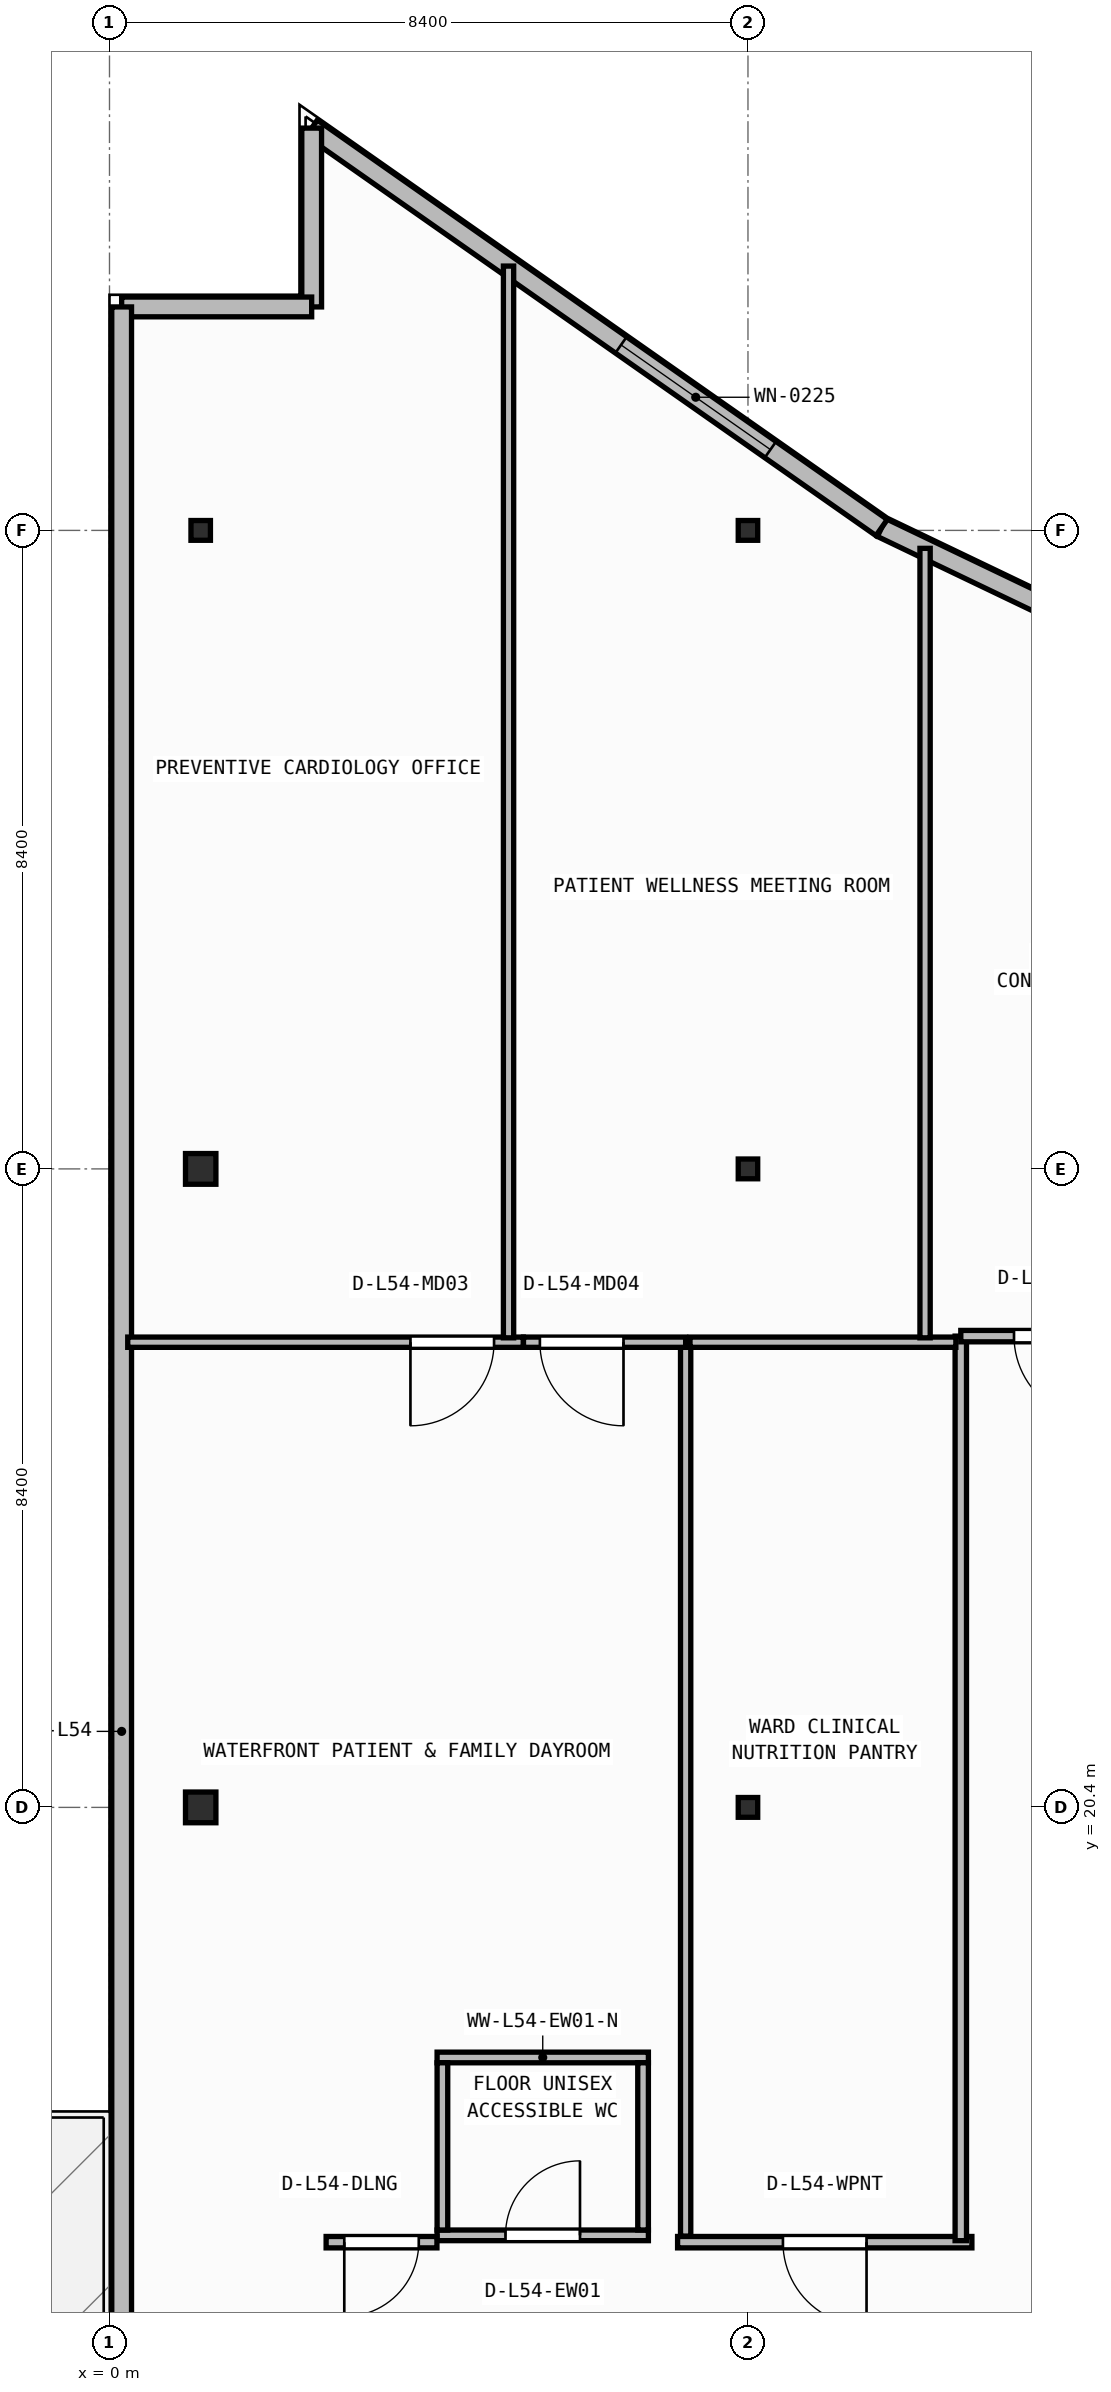
"""IFC4 building model, lengths in metres.
Left out: names, types, materials, properties, quantities, classifications, styles, units other than length and angle.
Written with IfcOpenShell. Run it as: python <this file> out.ifc"""

import sys

from ifc_helpers import new_model, si_unit, direction, frame, frame_2d, origin, origin_2d, place, context, subcontext, project, spatial, rectangle, i_section, extrude, element, fill, save


model = new_model("IFC4")
c1 = context("Model", 3, precision=1e-05, world=origin(), true_north=direction((0.0, 1.0)))
c2 = subcontext(c1, "Body", "Model", "MODEL_VIEW")
j1 = project(units=[si_unit("LENGTHUNIT", "METRE"), si_unit("PLANEANGLEUNIT", "RADIAN")], contexts=[c1])
p1 = place(None, origin())
s1 = spatial("IfcSite", under=j1, at=p1, CompositionType="ELEMENT")
p2 = place(p1, origin())
s2 = spatial("IfcBuilding", under=s1, at=p2, CompositionType="ELEMENT")
p3 = place(p2, frame((0.0, 0.0, 219.75)))
s3 = spatial("IfcBuildingStorey", under=s2, at=p3, CompositionType="ELEMENT", Elevation=219.75)
p4 = place(p3, frame((1.2, 20.4, 0.0), z_axis=(0.0, 0.0, 1.0), x_axis=(1.0, 0.0, 0.0)))
e1 = element("IfcColumn", 1, at=p4, inside=s3, PredefinedType="COLUMN", context=c2, shape_type="SweptSolid", body=[
    extrude(i_section(OverallWidth=0.4, OverallDepth=0.404, WebThickness=0.02, FlangeThickness=0.032, at=origin_2d()), origin(), (0.0, 0.0, 1.0), 3.95),
])
p5 = place(p3, frame((8.4, 20.4, 0.0), z_axis=(0.0, 0.0, 1.0), x_axis=(1.0, 0.0, 0.0)))
e2 = element("IfcColumn", 2, at=p5, inside=s3, PredefinedType="COLUMN", context=c2, shape_type="SweptSolid", body=[
    extrude(i_section(OverallWidth=0.256, OverallDepth=0.26, WebThickness=0.01, FlangeThickness=0.017, FilletRadius=0.013, at=origin_2d()), origin(), (0.0, 0.0, 1.0), 3.95),
])
p6 = place(p3, frame((1.2, 28.8, 0.0), z_axis=(0.0, 0.0, 1.0), x_axis=(1.0, 0.0, 0.0)))
e3 = element("IfcColumn", 3, at=p6, inside=s3, PredefinedType="COLUMN", context=c2, shape_type="SweptSolid", body=[
    extrude(i_section(OverallWidth=0.4, OverallDepth=0.404, WebThickness=0.02, FlangeThickness=0.032, at=origin_2d()), origin(), (0.0, 0.0, 1.0), 3.95),
])
for number, where, z_axis, x_axis in (
    (4, (8.4, 28.8, 0.0), (0.0, 0.0, 1.0), (1.0, 0.0, 0.0)),
    (5, (1.2, 37.2, 0.0), (0.0, 0.0, 1.0), (1.0, 0.0, 0.0)),
    (6, (8.4, 37.2, 0.0), (0.0, 0.0, 1.0), (1.0, 0.0, 0.0)),
):
    element("IfcColumn", number, at=place(p3, frame(where, z_axis=z_axis, x_axis=x_axis)), inside=s3, PredefinedType="COLUMN", context=c2, shape_type="SweptSolid", body=[
        extrude(i_section(OverallWidth=0.256, OverallDepth=0.26, WebThickness=0.01, FlangeThickness=0.017, FilletRadius=0.013, at=origin_2d()), origin(), (0.0, 0.0, 1.0), 3.95),
    ])
p7 = place(p3, frame((21.461, 31.823, 0.0), z_axis=(0.0, 0.0, 1.0), x_axis=(-0.901858094827, 0.432032379336, 0.0)))
e7 = element("IfcWall", 7, at=p7, inside=s3, PredefinedType="STANDARD", context=c2, shape_type="SweptSolid", body=[
    extrude(rectangle(XDim=12.532, YDim=0.26, at=frame_2d((6.266, 0.0))), origin(), (0.0, 0.0, 1.0), 3.71),
])
p8 = place(p7, frame((2.71, 0.0, 0.9)))
e8 = element("IfcOpeningElement", 8, at=p8, cuts=e7, PredefinedType="OPENING", context=c2, shape_type="SweptSolid", body=[
    extrude(rectangle(XDim=2.4, YDim=1.65, at=frame_2d((1.2, 0.825))), frame((0.0, 0.14, 0.0), z_axis=(0.0, -1.0, 0.0), x_axis=(1.0, 0.0, 0.0)), (0.0, 0.0, 1.0), 0.28),
])
p9 = place(p3, frame((10.159, 37.237, 0.0), z_axis=(0.0, 0.0, 1.0), x_axis=(-0.818933702389, 0.57388813465, 0.0)))
e9 = element("IfcWall", 9, at=p9, inside=s3, PredefinedType="STANDARD", context=c2, shape_type="SweptSolid", body=[
    extrude(rectangle(XDim=9.157, YDim=0.26, at=frame_2d((4.579, 0.0))), origin(), (0.0, 0.0, 1.0), 3.71),
])
p10 = place(p9, frame((1.787, 0.0, 0.9)))
e10 = element("IfcOpeningElement", 10, at=p10, cuts=e9, PredefinedType="OPENING", context=c2, shape_type="SweptSolid", body=[
    extrude(rectangle(XDim=2.4, YDim=1.65, at=frame_2d((1.2, 0.825))), frame((0.0, 0.14, 0.0), z_axis=(0.0, -1.0, 0.0), x_axis=(1.0, 0.0, 0.0)), (0.0, 0.0, 1.0), 0.28),
])
p11 = place(p3, frame((2.66, 42.492, 0.0), z_axis=(0.0, 0.0, 1.0), x_axis=(0.0, -1.0, 0.0)))
e11 = element("IfcWall", 11, at=p11, inside=s3, PredefinedType="STANDARD", context=c2, shape_type="SweptSolid", body=[
    extrude(rectangle(XDim=2.353, YDim=0.26, at=frame_2d((1.176, 0.0))), origin(), (0.0, 0.0, 1.0), 3.71),
])
p12 = place(p3, frame((2.66, 40.14, 0.0), z_axis=(0.0, 0.0, 1.0), x_axis=(-1.0, 0.0, 0.0)))
e12 = element("IfcWall", 12, at=p12, inside=s3, PredefinedType="STANDARD", context=c2, shape_type="SweptSolid", body=[
    extrude(rectangle(XDim=2.5, YDim=0.26, at=frame_2d((1.25, 0.0))), origin(), (0.0, 0.0, 1.0), 3.71),
])
p13 = place(p3, frame((0.16, 40.14, 0.0), z_axis=(0.0, 0.0, 1.0), x_axis=(0.0, -1.0, 0.0)))
e13 = element("IfcWall", 13, at=p13, inside=s3, PredefinedType="STANDARD", context=c2, shape_type="SweptSolid", body=[
    extrude(rectangle(XDim=37.48, YDim=0.26, at=frame_2d((18.74, 0.0))), origin(), (0.0, 0.0, 1.0), 3.71),
])
p14 = place(p13, frame((29.542, 0.0, 0.0)))
e14 = element("IfcOpeningElement", 14, at=p14, cuts=e13, PredefinedType="OPENING", context=c2, shape_type="SweptSolid", body=[
    extrude(rectangle(XDim=1.3, YDim=2.15, at=frame_2d((0.65, 1.075))), frame((0.0, 0.14, 0.0), z_axis=(0.0, -1.0, 0.0), x_axis=(1.0, 0.0, 0.0)), (0.0, 0.0, 1.0), 0.28),
])
p15 = place(p3, frame((4.31, 14.77, 0.0), z_axis=(0.0, 0.0, 1.0), x_axis=(1.0, 0.0, 0.0)))
e15 = element("IfcWall", 15, at=p15, inside=s3, PredefinedType="PARTITIONING", context=c2, shape_type="SweptSolid", body=[
    extrude(rectangle(XDim=2.78, YDim=0.14, at=frame_2d((1.39, 0.0))), origin(), (0.0, 0.0, 1.0), 3.71),
])
p16 = place(p15, frame((0.9, 0.0, 0.0)))
e16 = element("IfcOpeningElement", 16, at=p16, cuts=e15, PredefinedType="OPENING", context=c2, shape_type="SweptSolid", body=[
    extrude(rectangle(XDim=0.98, YDim=2.1, at=frame_2d((0.49, 1.05))), frame((0.0, 0.08, 0.0), z_axis=(0.0, -1.0, 0.0), x_axis=(1.0, 0.0, 0.0)), (0.0, 0.0, 1.0), 0.16),
])
p17 = place(p3, frame((4.31, 17.11, 0.0), z_axis=(0.0, 0.0, 1.0), x_axis=(1.0, 0.0, 0.0)))
e17 = element("IfcWall", 17, at=p17, inside=s3, PredefinedType="PARTITIONING", context=c2, shape_type="SweptSolid", body=[
    extrude(rectangle(XDim=2.78, YDim=0.14, at=frame_2d((1.39, 0.0))), origin(), (0.0, 0.0, 1.0), 3.71),
])
for number, where, z_axis, x_axis in (
    (18, (4.38, 14.84, 0.0), (0.0, 0.0, 1.0), (0.0, 1.0, 0.0)),
    (19, (7.02, 14.84, 0.0), (0.0, 0.0, 1.0), (0.0, 1.0, 0.0)),
):
    element("IfcWall", number, at=place(p3, frame(where, z_axis=z_axis, x_axis=x_axis)), inside=s3, PredefinedType="PARTITIONING", context=c2, shape_type="SweptSolid", body=[
        extrude(rectangle(XDim=2.2, YDim=0.14, at=frame_2d((1.1, 0.0))), origin(), (0.0, 0.0, 1.0), 3.71),
    ])
p18 = place(p3, frame((4.308, 14.68, 0.0), z_axis=(0.0, 0.0, 1.0), x_axis=(-1.0, 0.0, 0.0)))
e20 = element("IfcWall", 20, at=p18, inside=s3, PredefinedType="PARTITIONING", context=c2, shape_type="SweptSolid", body=[
    extrude(rectangle(XDim=1.458, YDim=0.15, at=frame_2d((0.729, 0.0))), origin(), (0.0, 0.0, 1.0), 3.71),
])
p19 = place(p18, frame((0.239, 0.0, 0.0)))
e21 = element("IfcOpeningElement", 21, at=p19, cuts=e20, PredefinedType="OPENING", context=c2, shape_type="SweptSolid", body=[
    extrude(rectangle(XDim=0.98, YDim=2.1, at=frame_2d((0.49, 1.05))), frame((0.0, 0.085, 0.0), z_axis=(0.0, -1.0, 0.0), x_axis=(1.0, 0.0, 0.0)), (0.0, 0.0, 1.0), 0.17),
])
p20 = place(p3, frame((11.346, 14.68, 0.0), z_axis=(0.0, 0.0, 1.0), x_axis=(-1.0, 0.0, 0.0)))
e22 = element("IfcWall", 22, at=p20, inside=s3, PredefinedType="PARTITIONING", context=c2, shape_type="SweptSolid", body=[
    extrude(rectangle(XDim=3.872, YDim=0.15, at=frame_2d((1.936, 0.0))), origin(), (0.0, 0.0, 1.0), 3.71),
])
p21 = place(p20, frame((1.386, 0.0, 0.0)))
e23 = element("IfcOpeningElement", 23, at=p21, cuts=e22, PredefinedType="OPENING", context=c2, shape_type="SweptSolid", body=[
    extrude(rectangle(XDim=1.1, YDim=2.1, at=frame_2d((0.55, 1.05))), frame((0.0, 0.085, 0.0), z_axis=(0.0, -1.0, 0.0), x_axis=(1.0, 0.0, 0.0)), (0.0, 0.0, 1.0), 0.17),
])
p22 = place(p3, frame((11.2, 26.6, 0.0), z_axis=(0.0, 0.0, 1.0), x_axis=(0.0, -1.0, 0.0)))
e24 = element("IfcWall", 24, at=p22, inside=s3, PredefinedType="PARTITIONING", context=c2, shape_type="SweptSolid", body=[
    extrude(rectangle(XDim=11.9, YDim=0.15, at=frame_2d((5.95, 0.0))), origin(), (0.0, 0.0, 1.0), 3.71),
])
p23 = place(p3, frame((13.7, 26.6, 0.0), z_axis=(0.0, 0.0, 1.0), x_axis=(-1.0, 0.0, 0.0)))
e25 = element("IfcWall", 25, at=p23, inside=s3, PredefinedType="PARTITIONING", context=c2, shape_type="SweptSolid", body=[
    extrude(rectangle(XDim=2.5, YDim=0.15, at=frame_2d((1.25, 0.0))), origin(), (0.0, 0.0, 1.0), 3.71),
])
p24 = place(p23, frame((0.7, 0.0, 0.0)))
e26 = element("IfcOpeningElement", 26, at=p24, cuts=e25, PredefinedType="OPENING", context=c2, shape_type="SweptSolid", body=[
    extrude(rectangle(XDim=1.1, YDim=2.1, at=frame_2d((0.55, 1.05))), frame((0.0, 0.085, 0.0), z_axis=(0.0, -1.0, 0.0), x_axis=(1.0, 0.0, 0.0)), (0.0, 0.0, 1.0), 0.17),
])
p25 = place(p3, frame((7.58, 14.76, 0.0), z_axis=(0.0, 0.0, 1.0), x_axis=(0.0, 1.0, 0.0)))
e27 = element("IfcWall", 27, at=p25, inside=s3, PredefinedType="PARTITIONING", context=c2, shape_type="SweptSolid", body=[
    extrude(rectangle(XDim=11.76, YDim=0.135, at=frame_2d((5.88, 0.0))), origin(), (0.0, 0.0, 1.0), 3.71),
])
p26 = place(p3, frame((5.445, 26.52, 0.0), z_axis=(0.0, 0.0, 1.0), x_axis=(-1.0, 0.0, 0.0)))
e28 = element("IfcWall", 28, at=p26, inside=s3, PredefinedType="PARTITIONING", context=c2, shape_type="SweptSolid", body=[
    extrude(rectangle(XDim=5.205, YDim=0.135, at=frame_2d((2.602, 0.0))), origin(), (0.0, 0.0, 1.0), 3.71),
])
p27 = place(p26, frame((0.385, 0.0, 0.0)))
e29 = element("IfcOpeningElement", 29, at=p27, cuts=e28, PredefinedType="OPENING", context=c2, shape_type="SweptSolid", body=[
    extrude(rectangle(XDim=1.1, YDim=2.1, at=frame_2d((0.55, 1.05))), frame((0.0, 0.077, 0.0), z_axis=(0.0, -1.0, 0.0), x_axis=(1.0, 0.0, 0.0)), (0.0, 0.0, 1.0), 0.155),
])
p28 = place(p3, frame((7.58, 26.52, 0.0), z_axis=(0.0, 0.0, 1.0), x_axis=(-1.0, 0.0, 0.0)))
e30 = element("IfcWall", 30, at=p28, inside=s3, PredefinedType="PARTITIONING", context=c2, shape_type="SweptSolid", body=[
    extrude(rectangle(XDim=2.134, YDim=0.135, at=frame_2d((1.067, 0.0))), origin(), (0.0, 0.0, 1.0), 3.71),
])
p29 = place(p28, frame((0.818, 0.0, 0.0)))
e31 = element("IfcOpeningElement", 31, at=p29, cuts=e30, PredefinedType="OPENING", context=c2, shape_type="SweptSolid", body=[
    extrude(rectangle(XDim=1.1, YDim=2.1, at=frame_2d((0.55, 1.05))), frame((0.0, 0.077, 0.0), z_axis=(0.0, -1.0, 0.0), x_axis=(1.0, 0.0, 0.0)), (0.0, 0.0, 1.0), 0.155),
])
p30 = place(p3, frame((11.135, 26.52, 0.0), z_axis=(0.0, 0.0, 1.0), x_axis=(-1.0, 0.0, 0.0)))
e32 = element("IfcWall", 32, at=p30, inside=s3, PredefinedType="PARTITIONING", context=c2, shape_type="SweptSolid", body=[
    extrude(rectangle(XDim=3.498, YDim=0.135, at=frame_2d((1.749, 0.0))), origin(), (0.0, 0.0, 1.0), 3.71),
])
p31 = place(p3, frame((5.25, 26.577, 0.0), z_axis=(0.0, 0.0, 1.0), x_axis=(0.0, 1.0, 0.0)))
e33 = element("IfcWall", 33, at=p31, inside=s3, PredefinedType="PARTITIONING", context=c2, shape_type="SweptSolid", body=[
    extrude(rectangle(XDim=14.1, YDim=0.135, at=frame_2d((7.05, 0.0))), origin(), (0.0, 0.0, 1.0), 3.71),
])
p32 = place(p3, frame((10.73, 26.577, 0.0), z_axis=(0.0, 0.0, 1.0), x_axis=(0.0, 1.0, 0.0)))
e34 = element("IfcWall", 34, at=p32, inside=s3, PredefinedType="PARTITIONING", context=c2, shape_type="SweptSolid", body=[
    extrude(rectangle(XDim=10.386, YDim=0.135, at=frame_2d((5.193, 0.0))), origin(), (0.0, 0.0, 1.0), 3.71),
])
p33 = place(p10, origin())
e35 = element("IfcWindow", 35, at=p33, inside=s3, PartitioningType="SINGLE_PANEL", PredefinedType="WINDOW", context=c2, shape_type="SweptSolid", body=[
    extrude(rectangle(XDim=2.4, YDim=1.65, at=frame_2d((1.2, 0.825))), frame((0.0, 0.03, 0.0), z_axis=(0.0, -1.0, 0.0), x_axis=(1.0, 0.0, 0.0)), (0.0, 0.0, 1.0), 0.06),
])
fill(e10, e35)
p34 = place(p16, origin())
e36 = element("IfcDoor", 36, at=p34, inside=s3, OperationType="SINGLE_SWING_RIGHT", PredefinedType="DOOR", context=c2, shape_type="SweptSolid", body=[
    extrude(rectangle(XDim=0.98, YDim=2.1, at=frame_2d((0.49, 1.05))), frame((0.0, 0.025, 0.0), z_axis=(0.0, -1.0, 0.0), x_axis=(1.0, 0.0, 0.0)), (0.0, 0.0, 1.0), 0.05),
])
fill(e16, e36)
p35 = place(p19, origin())
e37 = element("IfcDoor", 37, at=p35, inside=s3, OperationType="SINGLE_SWING_RIGHT", PredefinedType="DOOR", context=c2, shape_type="SweptSolid", body=[
    extrude(rectangle(XDim=0.98, YDim=2.1, at=frame_2d((0.49, 1.05))), frame((0.0, 0.025, 0.0), z_axis=(0.0, -1.0, 0.0), x_axis=(1.0, 0.0, 0.0)), (0.0, 0.0, 1.0), 0.05),
])
fill(e21, e37)
p36 = place(p21, origin())
e38 = element("IfcDoor", 38, at=p36, inside=s3, OperationType="SINGLE_SWING_LEFT", PredefinedType="DOOR", context=c2, shape_type="SweptSolid", body=[
    extrude(rectangle(XDim=1.1, YDim=2.1, at=frame_2d((0.55, 1.05))), frame((0.0, 0.025, 0.0), z_axis=(0.0, -1.0, 0.0), x_axis=(1.0, 0.0, 0.0)), (0.0, 0.0, 1.0), 0.05),
])
fill(e23, e38)
p37 = place(p24, origin())
e39 = element("IfcDoor", 39, at=p37, inside=s3, OperationType="SINGLE_SWING_LEFT", PredefinedType="DOOR", context=c2, shape_type="SweptSolid", body=[
    extrude(rectangle(XDim=1.1, YDim=2.1, at=frame_2d((0.55, 1.05))), frame((0.0, 0.025, 0.0), z_axis=(0.0, -1.0, 0.0), x_axis=(1.0, 0.0, 0.0)), (0.0, 0.0, 1.0), 0.05),
])
fill(e26, e39)
p38 = place(p27, origin())
e40 = element("IfcDoor", 40, at=p38, inside=s3, OperationType="SINGLE_SWING_RIGHT", PredefinedType="DOOR", context=c2, shape_type="SweptSolid", body=[
    extrude(rectangle(XDim=1.1, YDim=2.1, at=frame_2d((0.55, 1.05))), frame((0.0, 0.025, 0.0), z_axis=(0.0, -1.0, 0.0), x_axis=(1.0, 0.0, 0.0)), (0.0, 0.0, 1.0), 0.05),
])
fill(e29, e40)
p39 = place(p29, origin())
e41 = element("IfcDoor", 41, at=p39, inside=s3, OperationType="SINGLE_SWING_LEFT", PredefinedType="DOOR", context=c2, shape_type="SweptSolid", body=[
    extrude(rectangle(XDim=1.1, YDim=2.1, at=frame_2d((0.55, 1.05))), frame((0.0, 0.025, 0.0), z_axis=(0.0, -1.0, 0.0), x_axis=(1.0, 0.0, 0.0)), (0.0, 0.0, 1.0), 0.05),
])
fill(e31, e41)
save(model, sys.argv[1])
